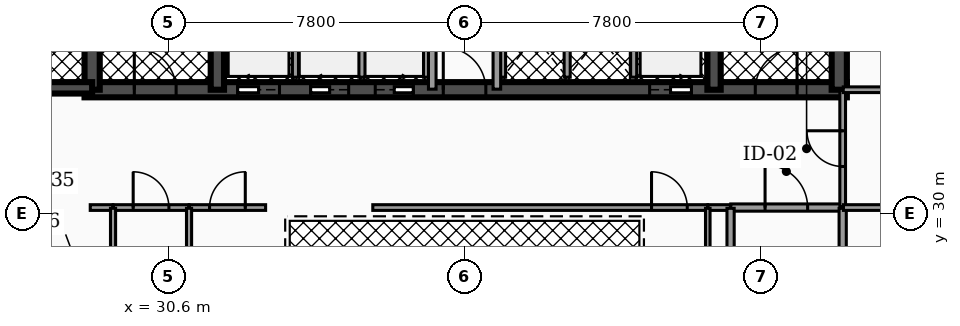
"""IFC4 building model, lengths in metres.
Left out: names, types, materials, properties, quantities, classifications, styles, units other than length and angle.
Written with IfcOpenShell. Run it as: python <this file> out.ifc"""

import sys

from ifc_helpers import new_model, si_unit, direction, frame, frame_2d, origin, place, context, subcontext, project, spatial, rectangle, extrude, element, fill, save


model = new_model("IFC4")
c1 = context("Model", 3, precision=1e-05, world=origin(), true_north=direction((0.0, 1.0)))
c2 = subcontext(c1, "Body", "Model", "MODEL_VIEW")
j1 = project(units=[si_unit("LENGTHUNIT", "METRE"), si_unit("PLANEANGLEUNIT", "RADIAN")], contexts=[c1])
p1 = place(None, origin())
s1 = spatial("IfcSite", under=j1, at=p1, CompositionType="ELEMENT")
p2 = place(p1, origin())
s2 = spatial("IfcBuilding", under=s1, at=p2, CompositionType="ELEMENT")
p3 = place(p2, frame((0.0, 0.0, 175.78)))
s3 = spatial("IfcBuildingStorey", under=s2, at=p3, CompositionType="ELEMENT", Elevation=175.78)
p4 = place(p3, frame((28.4, 33.25, 0.0), z_axis=(0.0, 0.0, 1.0), x_axis=(1.0, 0.0, 0.0)))
e1 = element("IfcWall", 1, at=p4, inside=s3, PredefinedType="SHEAR", context=c2, shape_type="SweptSolid", body=[
    extrude(rectangle(XDim=20.06, YDim=0.4, at=frame_2d((10.03, 0.0))), origin(), (0.0, 0.0, 1.0), 3.5),
])
p5 = place(p4, frame((4.03, 0.0, 0.0)))
e2 = element("IfcOpeningElement", 2, at=p5, cuts=e1, PredefinedType="OPENING", context=c2, shape_type="SweptSolid", body=[
    extrude(rectangle(XDim=1.1, YDim=2.15, at=frame_2d((0.55, 1.075))), frame((0.0, 0.21, 0.0), z_axis=(0.0, -1.0, 0.0), x_axis=(1.0, 0.0, 0.0)), (0.0, 0.0, 1.0), 0.42),
])
p6 = place(p4, frame((14.87, 0.0, 0.0)))
e3 = element("IfcOpeningElement", 3, at=p6, cuts=e1, PredefinedType="OPENING", context=c2, shape_type="SweptSolid", body=[
    extrude(rectangle(XDim=1.1, YDim=2.15, at=frame_2d((0.55, 1.075))), frame((0.0, 0.21, 0.0), z_axis=(0.0, -1.0, 0.0), x_axis=(1.0, 0.0, 0.0)), (0.0, 0.0, 1.0), 0.42),
])
p7 = place(p4, frame((5.95, 0.0, 0.0)))
e4 = element("IfcOpeningElement", 4, at=p7, cuts=e1, PredefinedType="OPENING", context=c2, shape_type="SweptSolid", body=[
    extrude(rectangle(XDim=1.0, YDim=2.1, at=frame_2d((0.5, 1.05))), frame((0.0, 0.21, 0.0), z_axis=(0.0, -1.0, 0.0), x_axis=(1.0, 0.0, 0.0)), (0.0, 0.0, 1.0), 0.42),
])
p8 = place(p4, frame((7.65, 0.0, 0.0)))
e5 = element("IfcOpeningElement", 5, at=p8, cuts=e1, PredefinedType="OPENING", context=c2, shape_type="SweptSolid", body=[
    extrude(rectangle(XDim=1.0, YDim=2.1, at=frame_2d((0.5, 1.05))), frame((0.0, 0.21, 0.0), z_axis=(0.0, -1.0, 0.0), x_axis=(1.0, 0.0, 0.0)), (0.0, 0.0, 1.0), 0.42),
])
p9 = place(p4, frame((1.31, 0.0, 0.0)))
e6 = element("IfcOpeningElement", 6, at=p9, cuts=e1, PredefinedType="OPENING", context=c2, shape_type="SweptSolid", body=[
    extrude(rectangle(XDim=1.1, YDim=2.2, at=frame_2d((0.55, 1.1))), frame((0.0, 0.21, 0.0), z_axis=(0.0, -1.0, 0.0), x_axis=(1.0, 0.0, 0.0)), (0.0, 0.0, 1.0), 0.42),
])
p10 = place(p4, frame((9.44, 0.0, 0.0)))
e7 = element("IfcOpeningElement", 7, at=p10, cuts=e1, PredefinedType="OPENING", context=c2, shape_type="SweptSolid", body=[
    extrude(rectangle(XDim=1.12, YDim=2.05, at=frame_2d((0.56, 1.025))), frame((0.0, 0.21, 0.0), z_axis=(0.0, -1.0, 0.0), x_axis=(1.0, 0.0, 0.0)), (0.0, 0.0, 1.0), 0.42),
])
p11 = place(p4, frame((17.65, 0.0, 0.0)))
e8 = element("IfcOpeningElement", 8, at=p11, cuts=e1, PredefinedType="OPENING", context=c2, shape_type="SweptSolid", body=[
    extrude(rectangle(XDim=1.1, YDim=2.2, at=frame_2d((0.55, 1.1))), frame((0.0, 0.21, 0.0), z_axis=(0.0, -1.0, 0.0), x_axis=(1.0, 0.0, 0.0)), (0.0, 0.0, 1.0), 0.42),
])
p12 = place(p3, frame((28.6, 33.25, 0.0), z_axis=(0.0, 0.0, 1.0), x_axis=(0.0, 1.0, 0.0)))
e9 = element("IfcWall", 9, at=p12, inside=s3, PredefinedType="SHEAR", context=c2, shape_type="SweptSolid", body=[
    extrude(rectangle(XDim=10.2, YDim=0.4, at=frame_2d((5.1, 0.0))), origin(), (0.0, 0.0, 1.0), 3.5),
])
for number, where, z_axis, x_axis in (
    (10, (31.895, 33.25, 0.0), (0.0, 0.0, 1.0), (0.0, 1.0, 0.0)),
    (11, (44.965, 33.25, 0.0), (0.0, 0.0, 1.0), (0.0, 1.0, 0.0)),
):
    element("IfcWall", number, at=place(p3, frame(where, z_axis=z_axis, x_axis=x_axis)), inside=s3, PredefinedType="SHEAR", context=c2, shape_type="SweptSolid", body=[
        extrude(rectangle(XDim=10.2, YDim=0.35, at=frame_2d((5.1, 0.0))), origin(), (0.0, 0.0, 1.0), 3.5),
    ])
p13 = place(p3, frame((48.26, 33.25, 0.0), z_axis=(0.0, 0.0, 1.0), x_axis=(0.0, 1.0, 0.0)))
e12 = element("IfcWall", 12, at=p13, inside=s3, PredefinedType="SHEAR", context=c2, shape_type="SweptSolid", body=[
    extrude(rectangle(XDim=10.2, YDim=0.4, at=frame_2d((5.1, 0.0))), origin(), (0.0, 0.0, 1.0), 3.5),
])
p14 = place(p3, frame((25.08, 33.3, 0.0), z_axis=(0.0, 0.0, 1.0), x_axis=(1.0, 0.0, 0.0)))
e13 = element("IfcWall", 13, at=p14, inside=s3, PredefinedType="SHEAR", context=c2, shape_type="SweptSolid", body=[
    extrude(rectangle(XDim=3.52, YDim=0.3, at=frame_2d((1.76, 0.0))), origin(), (0.0, 0.0, 1.0), 3.5),
])
p15 = place(p14, frame((1.335, 0.0, 0.0)))
e14 = element("IfcOpeningElement", 14, at=p15, cuts=e13, PredefinedType="OPENING", context=c2, shape_type="SweptSolid", body=[
    extrude(rectangle(XDim=0.95, YDim=2.2, at=frame_2d((0.475, 1.1))), frame((0.0, 0.16, 0.0), z_axis=(0.0, -1.0, 0.0), x_axis=(1.0, 0.0, 0.0)), (0.0, 0.0, 1.0), 0.32),
])
for number, where, z_axis, x_axis in (
    (15, (33.95, 33.58, 0.0), (0.0, 0.0, 1.0), (0.0, 1.0, 0.0)),
    (16, (42.85, 33.58, 0.0), (0.0, 0.0, 1.0), (0.0, 1.0, 0.0)),
):
    element("IfcWall", number, at=place(p3, frame(where, z_axis=z_axis, x_axis=x_axis)), inside=s3, PredefinedType="SOLIDWALL", context=c2, shape_type="SweptSolid", body=[
        extrude(rectangle(XDim=2.45, YDim=0.16, at=frame_2d((1.225, 0.0))), origin(), (0.0, 0.0, 1.0), 2.472),
    ])
for number, where, z_axis, x_axis in (
    (17, (35.7, 33.58, 0.0), (0.0, 0.0, 1.0), (0.0, 1.0, 0.0)),
    (18, (37.4, 33.58, 0.0), (0.0, 0.0, 1.0), (0.0, 1.0, 0.0)),
    (19, (39.4, 33.58, 0.0), (0.0, 0.0, 1.0), (0.0, 1.0, 0.0)),
    (20, (41.1, 33.58, 0.0), (0.0, 0.0, 1.0), (0.0, 1.0, 0.0)),
):
    element("IfcWall", number, at=place(p3, frame(where, z_axis=z_axis, x_axis=x_axis)), inside=s3, PredefinedType="SOLIDWALL", context=c2, shape_type="SweptSolid", body=[
        extrude(rectangle(XDim=2.25, YDim=0.16, at=frame_2d((1.125, 0.0))), origin(), (0.0, 0.0, 1.0), 2.472),
    ])
p16 = place(p3, frame((37.55, 33.265, 0.0), z_axis=(0.0, 0.0, 1.0), x_axis=(0.0, 1.0, 0.0)))
e21 = element("IfcWall", 21, at=p16, inside=s3, PredefinedType="PARTITIONING", context=c2, shape_type="SweptSolid", body=[
    extrude(rectangle(XDim=4.265, YDim=0.2, at=frame_2d((2.133, 0.0))), origin(), (0.0, 0.0, 1.0), 2.457),
])
p17 = place(p16, frame((3.093, 0.0, 0.0)))
e22 = element("IfcOpeningElement", 22, at=p17, cuts=e21, PredefinedType="OPENING", context=c2, shape_type="SweptSolid", body=[
    extrude(rectangle(XDim=0.88, YDim=2.05, at=frame_2d((0.44, 1.025))), frame((0.0, 0.11, 0.0), z_axis=(0.0, -1.0, 0.0), x_axis=(1.0, 0.0, 0.0)), (0.0, 0.0, 1.0), 0.22),
])
p18 = place(p3, frame((39.25, 33.265, 0.0), z_axis=(0.0, 0.0, 1.0), x_axis=(0.0, 1.0, 0.0)))
e23 = element("IfcWall", 23, at=p18, inside=s3, PredefinedType="PARTITIONING", context=c2, shape_type="SweptSolid", body=[
    extrude(rectangle(XDim=4.265, YDim=0.2, at=frame_2d((2.133, 0.0))), origin(), (0.0, 0.0, 1.0), 2.457),
])
p19 = place(p18, frame((3.093, 0.0, 0.0)))
e24 = element("IfcOpeningElement", 24, at=p19, cuts=e23, PredefinedType="OPENING", context=c2, shape_type="SweptSolid", body=[
    extrude(rectangle(XDim=0.88, YDim=2.05, at=frame_2d((0.44, 1.025))), frame((0.0, 0.11, 0.0), z_axis=(0.0, -1.0, 0.0), x_axis=(1.0, 0.0, 0.0)), (0.0, 0.0, 1.0), 0.22),
])
p20 = place(p3, frame((45.405, 30.15, 0.0), z_axis=(0.0, 0.0, 1.0), x_axis=(1.0, 0.0, 0.0)))
e25 = element("IfcWall", 25, at=p20, inside=s3, PredefinedType="PARTITIONING", context=c2, shape_type="SweptSolid", body=[
    extrude(rectangle(XDim=2.925, YDim=0.19, at=frame_2d((1.462, 0.0))), origin(), (0.0, 0.0, 1.0), 2.457),
])
p21 = place(p20, frame((0.903, 0.0, 0.0)))
e26 = element("IfcOpeningElement", 26, at=p21, cuts=e25, PredefinedType="OPENING", context=c2, shape_type="SweptSolid", body=[
    extrude(rectangle(XDim=1.12, YDim=2.05, at=frame_2d((0.56, 1.025))), frame((0.0, 0.105, 0.0), z_axis=(0.0, -1.0, 0.0), x_axis=(1.0, 0.0, 0.0)), (0.0, 0.0, 1.0), 0.21),
])
p22 = place(p3, frame((48.35, 30.17, 0.0), z_axis=(0.0, 0.0, 1.0), x_axis=(0.0, 1.0, 0.0)))
e27 = element("IfcWall", 27, at=p22, inside=s3, PredefinedType="PARTITIONING", context=c2, shape_type="SweptSolid", body=[
    extrude(rectangle(XDim=3.06, YDim=0.15, at=frame_2d((1.53, 0.0))), origin(), (0.0, 0.0, 1.0), 2.457),
])
p23 = place(p22, frame((1.06, 0.0, 0.0)))
e28 = element("IfcOpeningElement", 28, at=p23, cuts=e27, PredefinedType="OPENING", context=c2, shape_type="SweptSolid", body=[
    extrude(rectangle(XDim=0.94, YDim=2.05, at=frame_2d((0.47, 1.025))), frame((0.0, 0.085, 0.0), z_axis=(0.0, -1.0, 0.0), x_axis=(1.0, 0.0, 0.0)), (0.0, 0.0, 1.0), 0.17),
])
p24 = place(p3, frame((28.55, 30.15, 0.0), z_axis=(0.0, 0.0, 1.0), x_axis=(1.0, 0.0, 0.0)))
e29 = element("IfcWall", 29, at=p24, inside=s3, PredefinedType="PARTITIONING", context=c2, shape_type="SweptSolid", body=[
    extrude(rectangle(XDim=0.595, YDim=0.15, at=frame_2d((0.297, 0.0))), origin(), (0.0, 0.0, 1.0), 2.457),
])
p25 = place(p3, frame((29.155, 30.15, 0.0), z_axis=(0.0, 0.0, 1.0), x_axis=(1.0, 0.0, 0.0)))
e30 = element("IfcWall", 30, at=p25, inside=s3, PredefinedType="PARTITIONING", context=c2, shape_type="SweptSolid", body=[
    extrude(rectangle(XDim=1.99, YDim=0.15, at=frame_2d((0.995, 0.0))), origin(), (0.0, 0.0, 1.0), 2.457),
])
p26 = place(p25, frame((0.525, 0.0, 0.0)))
e31 = element("IfcOpeningElement", 31, at=p26, cuts=e30, PredefinedType="OPENING", context=c2, shape_type="SweptSolid", body=[
    extrude(rectangle(XDim=0.94, YDim=2.05, at=frame_2d((0.47, 1.025))), frame((0.0, 0.085, 0.0), z_axis=(0.0, -1.0, 0.0), x_axis=(1.0, 0.0, 0.0)), (0.0, 0.0, 1.0), 0.17),
])
p27 = place(p3, frame((31.155, 30.15, 0.0), z_axis=(0.0, 0.0, 1.0), x_axis=(1.0, 0.0, 0.0)))
e32 = element("IfcWall", 32, at=p27, inside=s3, PredefinedType="PARTITIONING", context=c2, shape_type="SweptSolid", body=[
    extrude(rectangle(XDim=2.01, YDim=0.15, at=frame_2d((1.005, 0.0))), origin(), (0.0, 0.0, 1.0), 2.457),
])
p28 = place(p27, frame((0.535, 0.0, 0.0)))
e33 = element("IfcOpeningElement", 33, at=p28, cuts=e32, PredefinedType="OPENING", context=c2, shape_type="SweptSolid", body=[
    extrude(rectangle(XDim=0.94, YDim=2.05, at=frame_2d((0.47, 1.025))), frame((0.0, 0.085, 0.0), z_axis=(0.0, -1.0, 0.0), x_axis=(1.0, 0.0, 0.0)), (0.0, 0.0, 1.0), 0.17),
])
p29 = place(p3, frame((35.985, 30.15, 0.0), z_axis=(0.0, 0.0, 1.0), x_axis=(1.0, 0.0, 0.0)))
e34 = element("IfcWall", 34, at=p29, inside=s3, PredefinedType="PARTITIONING", context=c2, shape_type="SweptSolid", body=[
    extrude(rectangle(XDim=8.81, YDim=0.15, at=frame_2d((4.405, 0.0))), origin(), (0.0, 0.0, 1.0), 2.457),
])
p30 = place(p29, frame((7.335, 0.0, 0.0)))
e35 = element("IfcOpeningElement", 35, at=p30, cuts=e34, PredefinedType="OPENING", context=c2, shape_type="SweptSolid", body=[
    extrude(rectangle(XDim=0.94, YDim=2.05, at=frame_2d((0.47, 1.025))), frame((0.0, 0.085, 0.0), z_axis=(0.0, -1.0, 0.0), x_axis=(1.0, 0.0, 0.0)), (0.0, 0.0, 1.0), 0.17),
])
p31 = place(p3, frame((44.805, 30.15, 0.0), z_axis=(0.0, 0.0, 1.0), x_axis=(1.0, 0.0, 0.0)))
e36 = element("IfcWall", 36, at=p31, inside=s3, PredefinedType="PARTITIONING", context=c2, shape_type="SweptSolid", body=[
    extrude(rectangle(XDim=0.59, YDim=0.15, at=frame_2d((0.295, 0.0))), origin(), (0.0, 0.0, 1.0), 2.457),
])
for number, where, z_axis, x_axis in (
    (37, (45.4, 27.37, 0.0), (0.0, 0.0, 1.0), (0.0, 1.0, 0.0)),
    (38, (48.35, 27.37, 0.0), (0.0, 0.0, 1.0), (0.0, 1.0, 0.0)),
):
    element("IfcWall", number, at=place(p3, frame(where, z_axis=z_axis, x_axis=x_axis)), inside=s3, PredefinedType="PARTITIONING", context=c2, shape_type="SweptSolid", body=[
        extrude(rectangle(XDim=2.76, YDim=0.19, at=frame_2d((1.38, 0.0))), origin(), (0.0, 0.0, 1.0), 2.457),
    ])
p32 = place(p3, frame((48.37, 30.15, 0.0), z_axis=(0.0, 0.0, 1.0), x_axis=(1.0, 0.0, 0.0)))
e39 = element("IfcWall", 39, at=p32, inside=s3, PredefinedType="PARTITIONING", context=c2, shape_type="SweptSolid", body=[
    extrude(rectangle(XDim=3.26, YDim=0.15, at=frame_2d((1.63, 0.0))), origin(), (0.0, 0.0, 1.0), 2.457),
])
p33 = place(p32, frame((1.16, 0.0, 0.0)))
e40 = element("IfcOpeningElement", 40, at=p33, cuts=e39, PredefinedType="OPENING", context=c2, shape_type="SweptSolid", body=[
    extrude(rectangle(XDim=0.94, YDim=2.05, at=frame_2d((0.47, 1.025))), frame((0.0, 0.085, 0.0), z_axis=(0.0, -1.0, 0.0), x_axis=(1.0, 0.0, 0.0)), (0.0, 0.0, 1.0), 0.17),
])
p34 = place(p3, frame((48.365, 33.25, 0.0), z_axis=(0.0, 0.0, 1.0), x_axis=(1.0, 0.0, 0.0)))
e41 = element("IfcWall", 41, at=p34, inside=s3, PredefinedType="PARTITIONING", context=c2, shape_type="SweptSolid", body=[
    extrude(rectangle(XDim=3.27, YDim=0.15, at=frame_2d((1.635, 0.0))), origin(), (0.0, 0.0, 1.0), 2.457),
])
p35 = place(p34, frame((1.165, 0.0, 0.0)))
e42 = element("IfcOpeningElement", 42, at=p35, cuts=e41, PredefinedType="OPENING", context=c2, shape_type="SweptSolid", body=[
    extrude(rectangle(XDim=0.94, YDim=2.05, at=frame_2d((0.47, 1.025))), frame((0.0, 0.085, 0.0), z_axis=(0.0, -1.0, 0.0), x_axis=(1.0, 0.0, 0.0)), (0.0, 0.0, 1.0), 0.17),
])
p36 = place(p3, frame((29.15, 27.17, 0.0), z_axis=(0.0, 0.0, 1.0), x_axis=(0.0, 1.0, 0.0)))
e43 = element("IfcWall", 43, at=p36, inside=s3, PredefinedType="PARTITIONING", context=c2, shape_type="SweptSolid", body=[
    extrude(rectangle(XDim=2.96, YDim=0.135, at=frame_2d((1.48, 0.0))), origin(), (0.0, 0.0, 1.0), 2.457),
])
p37 = place(p36, frame((1.05, 0.0, 0.0)))
e44 = element("IfcOpeningElement", 44, at=p37, cuts=e43, PredefinedType="OPENING", context=c2, shape_type="SweptSolid", body=[
    extrude(rectangle(XDim=0.86, YDim=2.05, at=frame_2d((0.43, 1.025))), frame((0.0, 0.077, 0.0), z_axis=(0.0, -1.0, 0.0), x_axis=(1.0, 0.0, 0.0)), (0.0, 0.0, 1.0), 0.155),
])
p38 = place(p3, frame((31.15, 27.17, 0.0), z_axis=(0.0, 0.0, 1.0), x_axis=(0.0, 1.0, 0.0)))
e45 = element("IfcWall", 45, at=p38, inside=s3, PredefinedType="PARTITIONING", context=c2, shape_type="SweptSolid", body=[
    extrude(rectangle(XDim=2.96, YDim=0.135, at=frame_2d((1.48, 0.0))), origin(), (0.0, 0.0, 1.0), 2.457),
])
p39 = place(p3, frame((44.8, 23.903, 0.0), z_axis=(0.0, 0.0, 1.0), x_axis=(0.0, 1.0, 0.0)))
e46 = element("IfcWall", 46, at=p39, inside=s3, PredefinedType="PARTITIONING", context=c2, shape_type="SweptSolid", body=[
    extrude(rectangle(XDim=6.227, YDim=0.12, at=frame_2d((3.114, 0.0))), origin(), (0.0, 0.0, 1.0), 2.457),
])
p40 = place(p5, origin())
e47 = element("IfcDoor", 47, at=p40, inside=s3, OperationType="SLIDING_TO_LEFT", PredefinedType="DOOR", context=c2, shape_type="SweptSolid", body=[
    extrude(rectangle(XDim=1.1, YDim=2.15, at=frame_2d((0.55, 1.075))), frame((0.0, 0.025, 0.0), z_axis=(0.0, -1.0, 0.0), x_axis=(1.0, 0.0, 0.0)), (0.0, 0.0, 1.0), 0.05),
])
fill(e2, e47)
p41 = place(p6, origin())
e48 = element("IfcDoor", 48, at=p41, inside=s3, OperationType="SLIDING_TO_RIGHT", PredefinedType="DOOR", context=c2, shape_type="SweptSolid", body=[
    extrude(rectangle(XDim=1.1, YDim=2.15, at=frame_2d((0.55, 1.075))), frame((0.0, 0.025, 0.0), z_axis=(0.0, -1.0, 0.0), x_axis=(1.0, 0.0, 0.0)), (0.0, 0.0, 1.0), 0.05),
])
fill(e3, e48)
p42 = place(p7, origin())
e49 = element("IfcDoor", 49, at=p42, inside=s3, OperationType="SLIDING_TO_LEFT", PredefinedType="DOOR", context=c2, shape_type="SweptSolid", body=[
    extrude(rectangle(XDim=1.0, YDim=2.1, at=frame_2d((0.5, 1.05))), frame((0.0, 0.025, 0.0), z_axis=(0.0, -1.0, 0.0), x_axis=(1.0, 0.0, 0.0)), (0.0, 0.0, 1.0), 0.05),
])
fill(e4, e49)
p43 = place(p8, origin())
e50 = element("IfcDoor", 50, at=p43, inside=s3, OperationType="SLIDING_TO_RIGHT", PredefinedType="DOOR", context=c2, shape_type="SweptSolid", body=[
    extrude(rectangle(XDim=1.0, YDim=2.1, at=frame_2d((0.5, 1.05))), frame((0.0, 0.025, 0.0), z_axis=(0.0, -1.0, 0.0), x_axis=(1.0, 0.0, 0.0)), (0.0, 0.0, 1.0), 0.05),
])
fill(e5, e50)
p44 = place(p9, origin())
e51 = element("IfcDoor", 51, at=p44, inside=s3, OperationType="SINGLE_SWING_LEFT", PredefinedType="DOOR", context=c2, shape_type="SweptSolid", body=[
    extrude(rectangle(XDim=1.1, YDim=2.2, at=frame_2d((0.55, 1.1))), frame((0.0, 0.025, 0.0), z_axis=(0.0, -1.0, 0.0), x_axis=(1.0, 0.0, 0.0)), (0.0, 0.0, 1.0), 0.05),
])
fill(e6, e51)
p45 = place(p10, origin())
e52 = element("IfcDoor", 52, at=p45, inside=s3, OperationType="SINGLE_SWING_LEFT", PredefinedType="DOOR", context=c2, shape_type="SweptSolid", body=[
    extrude(rectangle(XDim=1.12, YDim=2.05, at=frame_2d((0.56, 1.025))), frame((0.0, 0.025, 0.0), z_axis=(0.0, -1.0, 0.0), x_axis=(1.0, 0.0, 0.0)), (0.0, 0.0, 1.0), 0.05),
])
fill(e7, e52)
p46 = place(p11, origin())
e53 = element("IfcDoor", 53, at=p46, inside=s3, OperationType="SINGLE_SWING_RIGHT", PredefinedType="DOOR", context=c2, shape_type="SweptSolid", body=[
    extrude(rectangle(XDim=1.1, YDim=2.2, at=frame_2d((0.55, 1.1))), frame((0.0, 0.025, 0.0), z_axis=(0.0, -1.0, 0.0), x_axis=(1.0, 0.0, 0.0)), (0.0, 0.0, 1.0), 0.05),
])
fill(e8, e53)
p47 = place(p21, origin())
e54 = element("IfcDoor", 54, at=p47, inside=s3, OperationType="SINGLE_SWING_LEFT", PredefinedType="DOOR", context=c2, shape_type="SweptSolid", body=[
    extrude(rectangle(XDim=1.12, YDim=2.05, at=frame_2d((0.56, 1.025))), frame((0.0, 0.025, 0.0), z_axis=(0.0, -1.0, 0.0), x_axis=(1.0, 0.0, 0.0)), (0.0, 0.0, 1.0), 0.05),
])
fill(e26, e54)
p48 = place(p23, origin())
e55 = element("IfcDoor", 55, at=p48, inside=s3, OperationType="SINGLE_SWING_RIGHT", PredefinedType="DOOR", context=c2, shape_type="SweptSolid", body=[
    extrude(rectangle(XDim=0.94, YDim=2.05, at=frame_2d((0.47, 1.025))), frame((0.0, 0.025, 0.0), z_axis=(0.0, -1.0, 0.0), x_axis=(1.0, 0.0, 0.0)), (0.0, 0.0, 1.0), 0.05),
])
fill(e28, e55)
p49 = place(p26, origin())
e56 = element("IfcDoor", 56, at=p49, inside=s3, OperationType="SINGLE_SWING_LEFT", PredefinedType="DOOR", context=c2, shape_type="SweptSolid", body=[
    extrude(rectangle(XDim=0.94, YDim=2.05, at=frame_2d((0.47, 1.025))), frame((0.0, 0.025, 0.0), z_axis=(0.0, -1.0, 0.0), x_axis=(1.0, 0.0, 0.0)), (0.0, 0.0, 1.0), 0.05),
])
fill(e31, e56)
p50 = place(p28, origin())
e57 = element("IfcDoor", 57, at=p50, inside=s3, OperationType="SINGLE_SWING_RIGHT", PredefinedType="DOOR", context=c2, shape_type="SweptSolid", body=[
    extrude(rectangle(XDim=0.94, YDim=2.05, at=frame_2d((0.47, 1.025))), frame((0.0, 0.025, 0.0), z_axis=(0.0, -1.0, 0.0), x_axis=(1.0, 0.0, 0.0)), (0.0, 0.0, 1.0), 0.05),
])
fill(e33, e57)
p51 = place(p30, origin())
e58 = element("IfcDoor", 58, at=p51, inside=s3, OperationType="SINGLE_SWING_LEFT", PredefinedType="DOOR", context=c2, shape_type="SweptSolid", body=[
    extrude(rectangle(XDim=0.94, YDim=2.05, at=frame_2d((0.47, 1.025))), frame((0.0, 0.025, 0.0), z_axis=(0.0, -1.0, 0.0), x_axis=(1.0, 0.0, 0.0)), (0.0, 0.0, 1.0), 0.05),
])
fill(e35, e58)
save(model, sys.argv[1])
